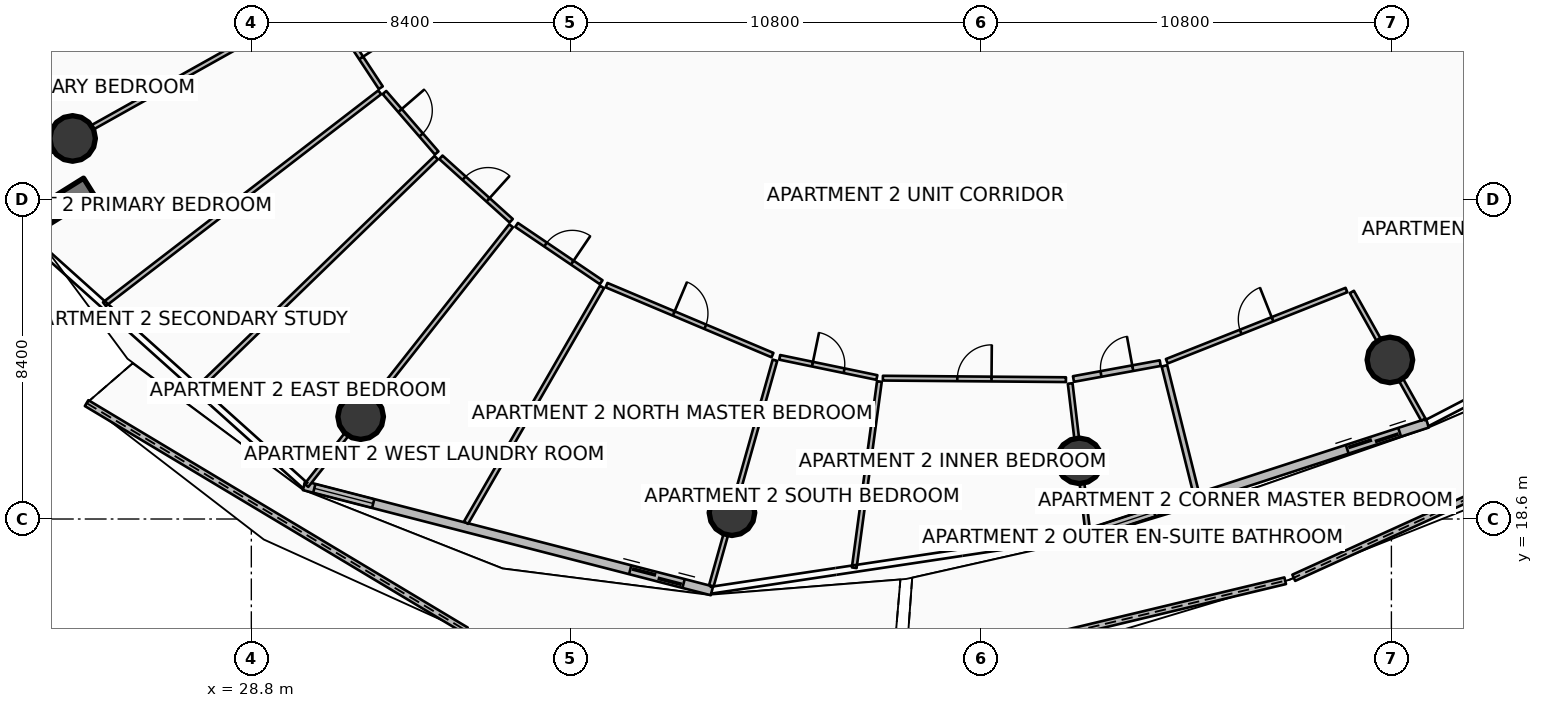
"""IFC4 building model, lengths in metres.
Left out: names, types, materials, properties, quantities, classifications, styles, units other than length and angle.
Written with IfcOpenShell. Run it as: python <this file> out.ifc"""

import sys

from ifc_helpers import new_model, si_unit, direction, frame, frame_2d, origin, origin_2d, place, context, subcontext, project, spatial, polyline, rectangle, circle, outline, extrude, element, fill, save


model = new_model("IFC4")
c1 = context("Model", 3, precision=1e-05, world=origin(), true_north=direction((0.0, 1.0)))
c2 = subcontext(c1, "Body", "Model", "MODEL_VIEW")
j1 = project(units=[si_unit("LENGTHUNIT", "METRE"), si_unit("PLANEANGLEUNIT", "RADIAN")], contexts=[c1])
p1 = place(None, origin())
s1 = spatial("IfcSite", under=j1, at=p1, CompositionType="ELEMENT")
p2 = place(p1, origin())
s2 = spatial("IfcBuilding", under=s1, at=p2, CompositionType="ELEMENT")
p3 = place(p2, frame((0.0, 0.0, 105.15)))
s3 = spatial("IfcBuildingStorey", under=s2, at=p3, CompositionType="ELEMENT", Elevation=105.15)
p4 = place(p3, frame((24.531, 27.335, 0.0), z_axis=(0.0, 0.0, 1.0), x_axis=(-0.848053161125, -0.529911158502, 0.0)))
e1 = element("IfcWall", 1, at=p4, inside=s3, PredefinedType="SOLIDWALL", context=c2, shape_type="SweptSolid", body=[
    extrude(rectangle(XDim=3.5, YDim=0.55, at=frame_2d((1.75, 0.0))), origin(), (0.0, 0.0, 1.0), 3.75),
])
for number, where, z_axis, x_axis in (
    (2, (24.097, 28.614, 0.0), (0.0, 0.0, 1.0), (1.0, 0.0, 0.0)),
    (3, (31.677, 21.294, 0.0), (0.0, 0.0, 1.0), (1.0, 0.0, 0.0)),
    (4, (41.447, 18.766, 0.0), (0.0, 0.0, 1.0), (1.0, 0.0, 0.0)),
    (5, (50.588, 20.131, 0.0), (0.0, 0.0, 1.0), (1.0, 0.0, 0.0)),
    (6, (58.76, 22.786, 0.0), (0.0, 0.0, 1.0), (1.0, 0.0, 0.0)),
):
    element("IfcColumn", number, at=place(p3, frame(where, z_axis=z_axis, x_axis=x_axis)), inside=s3, PredefinedType="COLUMN", context=c2, shape_type="SweptSolid", body=[
        extrude(circle(Radius=0.6, at=origin_2d()), origin(), (0.0, 0.0, 1.0), 3.5),
    ])
p5 = place(p3, frame((24.466, 21.65, 0.0), z_axis=(0.0, 0.0, 1.0), x_axis=(0.857737151829, -0.514088492745, 0.0)))
e7 = element("IfcWall", 7, at=p5, inside=s3, PredefinedType="PARAPET", context=c2, shape_type="SweptSolid", body=[
    extrude(outline(polyline([(0.0, 0.0), (11.638, 0.0), (11.638, 1.348), (5.819, 1.182), (0.0, 1.12), (0.0, 0.0)])), frame((0.0, 0.09, 0.0), z_axis=(0.0, -1.0, 0.0), x_axis=(1.0, 0.0, 0.0)), (0.0, 0.0, 1.0), 0.18),
])
p6 = place(p3, frame((46.01, 14.581, 0.0), z_axis=(0.0, 0.0, 1.0), x_axis=(0.972484896486, 0.232965933359, 0.0)))
e8 = element("IfcWall", 8, at=p6, inside=s3, PredefinedType="PARAPET", context=c2, shape_type="SweptSolid", body=[
    extrude(outline(polyline([(0.0, 0.0), (10.277, 0.0), (10.277, 1.832), (5.139, 1.853), (0.0, 1.756), (0.0, 0.0)])), frame((0.0, 0.09, 0.0), z_axis=(0.0, -1.0, 0.0), x_axis=(1.0, 0.0, 0.0)), (0.0, 0.0, 1.0), 0.18),
])
p7 = place(p3, frame((56.231, 17.053, 0.0), z_axis=(0.0, 0.0, 1.0), x_axis=(0.910226702808, 0.41411031078, 0.0)))
e9 = element("IfcWall", 9, at=p7, inside=s3, PredefinedType="PARAPET", context=c2, shape_type="SweptSolid", body=[
    extrude(outline(polyline([(0.0, 0.0), (10.173, 0.0), (10.173, 1.497), (5.086, 1.696), (0.0, 1.832), (0.0, 0.0)])), frame((0.0, 0.09, 0.0), z_axis=(0.0, -1.0, 0.0), x_axis=(1.0, 0.0, 0.0)), (0.0, 0.0, 1.0), 0.18),
])
p8 = place(p3, frame((30.186, 19.477, 0.0), z_axis=(0.0, 0.0, 1.0), x_axis=(0.968356180858, -0.249572248045, 0.0)))
e10 = element("IfcWall", 10, at=p8, inside=s3, PredefinedType="SOLIDWALL", context=c2, shape_type="SweptSolid", body=[
    extrude(rectangle(XDim=11.084, YDim=0.24, at=frame_2d((5.542, 0.0))), origin(), (0.0, 0.0, 1.0), 2.45),
])
p9 = place(p8, frame((8.865, 0.0, 0.0)))
e11 = element("IfcOpeningElement", 11, at=p9, cuts=e10, PredefinedType="OPENING", context=c2, shape_type="SweptSolid", body=[
    extrude(rectangle(XDim=1.45, YDim=2.15, at=frame_2d((0.725, 1.075))), frame((0.0, 0.13, 0.0), z_axis=(0.0, -1.0, 0.0), x_axis=(1.0, 0.0, 0.0)), (0.0, 0.0, 1.0), 0.26),
])
p10 = place(p8, frame((0.28, 0.0, 0.65)))
e12 = element("IfcOpeningElement", 12, at=p10, cuts=e10, PredefinedType="OPENING", context=c2, shape_type="SweptSolid", body=[
    extrude(rectangle(XDim=1.6, YDim=1.5, at=frame_2d((0.8, 0.75))), frame((0.0, 0.13, 0.0), z_axis=(0.0, -1.0, 0.0), x_axis=(1.0, 0.0, 0.0)), (0.0, 0.0, 1.0), 0.26),
])
p11 = place(p3, frame((50.767, 18.203, 0.0), z_axis=(0.0, 0.0, 1.0), x_axis=(0.951052494852, 0.30902937083, 0.0)))
e13 = element("IfcWall", 13, at=p11, inside=s3, PredefinedType="SOLIDWALL", context=c2, shape_type="SweptSolid", body=[
    extrude(rectangle(XDim=9.444, YDim=0.24, at=frame_2d((4.722, 0.0))), origin(), (0.0, 0.0, 1.0), 2.45),
])
p12 = place(p11, frame((7.224, 0.0, 0.0)))
e14 = element("IfcOpeningElement", 14, at=p12, cuts=e13, PredefinedType="OPENING", context=c2, shape_type="SweptSolid", body=[
    extrude(rectangle(XDim=1.45, YDim=2.15, at=frame_2d((0.725, 1.075))), frame((0.0, 0.13, 0.0), z_axis=(0.0, -1.0, 0.0), x_axis=(1.0, 0.0, 0.0)), (0.0, 0.0, 1.0), 0.26),
])
p13 = place(p11, frame((0.28, 0.0, 0.65)))
e15 = element("IfcOpeningElement", 15, at=p13, cuts=e13, PredefinedType="OPENING", context=c2, shape_type="SweptSolid", body=[
    extrude(rectangle(XDim=1.6, YDim=1.5, at=frame_2d((0.8, 0.75))), frame((0.0, 0.13, 0.0), z_axis=(0.0, -1.0, 0.0), x_axis=(1.0, 0.0, 0.0)), (0.0, 0.0, 1.0), 0.26),
])
p14 = place(p3, frame((30.575, 32.241, 0.0), z_axis=(0.0, 0.0, 1.0), x_axis=(-0.872502512898, -0.488609624328, 0.0)))
e16 = element("IfcWall", 16, at=p14, inside=s3, PredefinedType="PARTITIONING", context=c2, shape_type="SweptSolid", body=[
    extrude(rectangle(XDim=9.508, YDim=0.125, at=frame_2d((4.754, 0.0))), origin(), (0.0, 0.0, 1.0), 2.94),
])
p15 = place(p3, frame((32.179, 29.827, 0.0), z_axis=(0.0, 0.0, 1.0), x_axis=(-0.792545547833, -0.609812720932, 0.0)))
e17 = element("IfcWall", 17, at=p15, inside=s3, PredefinedType="PARTITIONING", context=c2, shape_type="SweptSolid", body=[
    extrude(rectangle(XDim=9.141, YDim=0.125, at=frame_2d((4.571, 0.0))), origin(), (0.0, 0.0, 1.0), 2.94),
])
p16 = place(p3, frame((33.665, 28.108, 0.0), z_axis=(0.0, 0.0, 1.0), x_axis=(-0.718119545748, -0.695919764064, 0.0)))
e18 = element("IfcWall", 18, at=p16, inside=s3, PredefinedType="PARTITIONING", context=c2, shape_type="SweptSolid", body=[
    extrude(rectangle(XDim=8.721, YDim=0.125, at=frame_2d((4.36, 0.0))), origin(), (0.0, 0.0, 1.0), 2.94),
])
p17 = place(p3, frame((30.706, 32.223, 0.0), z_axis=(0.0, 0.0, 1.0), x_axis=(0.550682420902, -0.834714844309, 0.0)))
e19 = element("IfcWall", 19, at=p17, inside=s3, PredefinedType="PARTITIONING", context=c2, shape_type="SweptSolid", body=[
    extrude(rectangle(XDim=2.725, YDim=0.125, at=frame_2d((1.362, 0.0))), origin(), (0.0, 0.0, 1.0), 2.94),
])
p18 = place(p17, frame((0.937, 0.0, 0.0)))
e20 = element("IfcOpeningElement", 20, at=p18, cuts=e19, PredefinedType="OPENING", context=c2, shape_type="SweptSolid", body=[
    extrude(rectangle(XDim=0.85, YDim=2.06, at=frame_2d((0.425, 1.03))), frame((0.0, 0.073, 0.0), z_axis=(0.0, -1.0, 0.0), x_axis=(1.0, 0.0, 0.0)), (0.0, 0.0, 1.0), 0.145),
])
p19 = place(p3, frame((32.302, 29.822, 0.0), z_axis=(0.0, 0.0, 1.0), x_axis=(0.653904073591, -0.756577466318, 0.0)))
e21 = element("IfcWall", 21, at=p19, inside=s3, PredefinedType="PARTITIONING", context=c2, shape_type="SweptSolid", body=[
    extrude(rectangle(XDim=2.102, YDim=0.125, at=frame_2d((1.051, 0.0))), origin(), (0.0, 0.0, 1.0), 2.94),
])
p20 = place(p19, frame((0.626, 0.0, 0.0)))
e22 = element("IfcOpeningElement", 22, at=p20, cuts=e21, PredefinedType="OPENING", context=c2, shape_type="SweptSolid", body=[
    extrude(rectangle(XDim=0.85, YDim=2.06, at=frame_2d((0.425, 1.03))), frame((0.0, 0.073, 0.0), z_axis=(0.0, -1.0, 0.0), x_axis=(1.0, 0.0, 0.0)), (0.0, 0.0, 1.0), 0.145),
])
p21 = place(p3, frame((33.789, 28.117, 0.0), z_axis=(0.0, 0.0, 1.0), x_axis=(0.742250438722, -0.670122590439, 0.0)))
e23 = element("IfcWall", 23, at=p21, inside=s3, PredefinedType="PARTITIONING", context=c2, shape_type="SweptSolid", body=[
    extrude(rectangle(XDim=2.491, YDim=0.125, at=frame_2d((1.246, 0.0))), origin(), (0.0, 0.0, 1.0), 2.94),
])
p22 = place(p21, frame((0.821, 0.0, 0.0)))
e24 = element("IfcOpeningElement", 24, at=p22, cuts=e23, PredefinedType="OPENING", context=c2, shape_type="SweptSolid", body=[
    extrude(rectangle(XDim=0.85, YDim=2.06, at=frame_2d((0.425, 1.03))), frame((0.0, 0.073, 0.0), z_axis=(0.0, -1.0, 0.0), x_axis=(1.0, 0.0, 0.0)), (0.0, 0.0, 1.0), 0.145),
])
p23 = place(p3, frame((35.635, 26.316, 0.0), z_axis=(0.0, 0.0, 1.0), x_axis=(-0.619089966413, -0.785320070727, 0.0)))
e25 = element("IfcWall", 25, at=p23, inside=s3, PredefinedType="PARTITIONING", context=c2, shape_type="SweptSolid", body=[
    extrude(rectangle(XDim=8.699, YDim=0.125, at=frame_2d((4.35, 0.0))), origin(), (0.0, 0.0, 1.0), 2.94),
])
p24 = place(p3, frame((38.028, 24.707, 0.0), z_axis=(0.0, 0.0, 1.0), x_axis=(-0.499570967342, -0.866272964249, 0.0)))
e26 = element("IfcWall", 26, at=p24, inside=s3, PredefinedType="PARTITIONING", context=c2, shape_type="SweptSolid", body=[
    extrude(rectangle(XDim=7.162, YDim=0.125, at=frame_2d((3.581, 0.0))), origin(), (0.0, 0.0, 1.0), 2.94),
])
p25 = place(p3, frame((35.78, 26.338, 0.0), z_axis=(0.0, 0.0, 1.0), x_axis=(0.827963562543, -0.560781899762, 0.0)))
e27 = element("IfcWall", 27, at=p25, inside=s3, PredefinedType="PARTITIONING", context=c2, shape_type="SweptSolid", body=[
    extrude(rectangle(XDim=2.689, YDim=0.125, at=frame_2d((1.345, 0.0))), origin(), (0.0, 0.0, 1.0), 2.94),
])
p26 = place(p25, frame((0.92, 0.0, 0.0)))
e28 = element("IfcOpeningElement", 28, at=p26, cuts=e27, PredefinedType="OPENING", context=c2, shape_type="SweptSolid", body=[
    extrude(rectangle(XDim=0.85, YDim=2.06, at=frame_2d((0.425, 1.03))), frame((0.0, 0.073, 0.0), z_axis=(0.0, -1.0, 0.0), x_axis=(1.0, 0.0, 0.0)), (0.0, 0.0, 1.0), 0.145),
])
p27 = place(p3, frame((38.147, 24.754, 0.0), z_axis=(0.0, 0.0, 1.0), x_axis=(0.921465596947, -0.388459976888, 0.0)))
e29 = element("IfcWall", 29, at=p27, inside=s3, PredefinedType="PARTITIONING", context=c2, shape_type="SweptSolid", body=[
    extrude(rectangle(XDim=4.74, YDim=0.125, at=frame_2d((2.37, 0.0))), origin(), (0.0, 0.0, 1.0), 2.94),
])
p28 = place(p27, frame((1.92, 0.0, 0.0)))
e30 = element("IfcOpeningElement", 30, at=p28, cuts=e29, PredefinedType="OPENING", context=c2, shape_type="SweptSolid", body=[
    extrude(rectangle(XDim=0.9, YDim=2.08, at=frame_2d((0.45, 1.04))), frame((0.0, 0.073, 0.0), z_axis=(0.0, -1.0, 0.0), x_axis=(1.0, 0.0, 0.0)), (0.0, 0.0, 1.0), 0.145),
])
p29 = place(p3, frame((42.579, 22.778, 0.0), z_axis=(0.0, 0.0, 1.0), x_axis=(-0.271466748189, -0.962447819171, 0.0)))
e31 = element("IfcWall", 31, at=p29, inside=s3, PredefinedType="PARTITIONING", context=c2, shape_type="SweptSolid", body=[
    extrude(rectangle(XDim=6.166, YDim=0.125, at=frame_2d((3.083, 0.0))), origin(), (0.0, 0.0, 1.0), 2.94),
])
p30 = place(p3, frame((45.327, 22.218, 0.0), z_axis=(0.0, 0.0, 1.0), x_axis=(-0.133861540622, -0.99100004437, 0.0)))
e32 = element("IfcWall", 32, at=p30, inside=s3, PredefinedType="PARTITIONING", context=c2, shape_type="SweptSolid", body=[
    extrude(rectangle(XDim=4.944, YDim=0.125, at=frame_2d((2.472, 0.0))), origin(), (0.0, 0.0, 1.0), 2.94),
])
p31 = place(p3, frame((42.704, 22.854, 0.0), z_axis=(0.0, 0.0, 1.0), x_axis=(0.979145769619, -0.203158957069, 0.0)))
e33 = element("IfcWall", 33, at=p31, inside=s3, PredefinedType="PARTITIONING", context=c2, shape_type="SweptSolid", body=[
    extrude(rectangle(XDim=2.611, YDim=0.125, at=frame_2d((1.306, 0.0))), origin(), (0.0, 0.0, 1.0), 2.94),
])
p32 = place(p31, frame((0.881, 0.0, 0.0)))
e34 = element("IfcOpeningElement", 34, at=p32, cuts=e33, PredefinedType="OPENING", context=c2, shape_type="SweptSolid", body=[
    extrude(rectangle(XDim=0.85, YDim=2.06, at=frame_2d((0.425, 1.03))), frame((0.0, 0.073, 0.0), z_axis=(0.0, -1.0, 0.0), x_axis=(1.0, 0.0, 0.0)), (0.0, 0.0, 1.0), 0.145),
])
p33 = place(p3, frame((45.419, 22.306, 0.0), z_axis=(0.0, 0.0, 1.0), x_axis=(0.99996628587, -0.008211401983, 0.0)))
e35 = element("IfcWall", 35, at=p33, inside=s3, PredefinedType="PARTITIONING", context=c2, shape_type="SweptSolid", body=[
    extrude(rectangle(XDim=4.817, YDim=0.125, at=frame_2d((2.408, 0.0))), origin(), (0.0, 0.0, 1.0), 2.94),
])
p34 = place(p33, frame((1.958, 0.0, 0.0)))
e36 = element("IfcOpeningElement", 36, at=p34, cuts=e35, PredefinedType="OPENING", context=c2, shape_type="SweptSolid", body=[
    extrude(rectangle(XDim=0.9, YDim=2.08, at=frame_2d((0.45, 1.04))), frame((0.0, 0.073, 0.0), z_axis=(0.0, -1.0, 0.0), x_axis=(1.0, 0.0, 0.0)), (0.0, 0.0, 1.0), 0.145),
])
p35 = place(p3, frame((50.347, 22.167, 0.0), z_axis=(0.0, 0.0, 1.0), x_axis=(0.117544011215, -0.993067674143, 0.0)))
e37 = element("IfcWall", 37, at=p35, inside=s3, PredefinedType="PARTITIONING", context=c2, shape_type="SweptSolid", body=[
    extrude(rectangle(XDim=3.95, YDim=0.125, at=frame_2d((1.975, 0.0))), origin(), (0.0, 0.0, 1.0), 2.94),
])
p36 = place(p3, frame((57.759, 24.575, 0.0), z_axis=(0.0, 0.0, 1.0), x_axis=(0.488595646066, -0.87251034071, 0.0)))
e38 = element("IfcWall", 38, at=p36, inside=s3, PredefinedType="PARTITIONING", context=c2, shape_type="SweptSolid", body=[
    extrude(rectangle(XDim=3.851, YDim=0.125, at=frame_2d((1.925, 0.0))), origin(), (0.0, 0.0, 1.0), 2.94),
])
p37 = place(p3, frame((50.434, 22.284, 0.0), z_axis=(0.0, 0.0, 1.0), x_axis=(0.983653785842, 0.18007006858, 0.0)))
e39 = element("IfcWall", 39, at=p37, inside=s3, PredefinedType="PARTITIONING", context=c2, shape_type="SweptSolid", body=[
    extrude(rectangle(XDim=2.321, YDim=0.15, at=frame_2d((1.161, 0.0))), origin(), (0.0, 0.0, 1.0), 2.94),
])
p38 = place(p37, frame((0.736, 0.0, 0.0)))
e40 = element("IfcOpeningElement", 40, at=p38, cuts=e39, PredefinedType="OPENING", context=c2, shape_type="SweptSolid", body=[
    extrude(rectangle(XDim=0.85, YDim=2.06, at=frame_2d((0.425, 1.03))), frame((0.0, 0.085, 0.0), z_axis=(0.0, -1.0, 0.0), x_axis=(1.0, 0.0, 0.0)), (0.0, 0.0, 1.0), 0.17),
])
p39 = place(p3, frame((52.828, 22.631, 0.0), z_axis=(0.0, 0.0, 1.0), x_axis=(0.241821205531, -0.970320825581, 0.0)))
e41 = element("IfcWall", 41, at=p39, inside=s3, PredefinedType="PARTITIONING", context=c2, shape_type="SweptSolid", body=[
    extrude(rectangle(XDim=3.458, YDim=0.15, at=frame_2d((1.729, 0.0))), origin(), (0.0, 0.0, 1.0), 2.94),
])
p40 = place(p3, frame((52.889, 22.751, 0.0), z_axis=(0.0, 0.0, 1.0), x_axis=(0.929640857273, 0.368466927266, 0.0)))
e42 = element("IfcWall", 42, at=p40, inside=s3, PredefinedType="PARTITIONING", context=c2, shape_type="SweptSolid", body=[
    extrude(rectangle(XDim=5.085, YDim=0.125, at=frame_2d((2.543, 0.0))), origin(), (0.0, 0.0, 1.0), 2.94),
])
p41 = place(p40, frame((2.093, 0.0, 0.0)))
e43 = element("IfcOpeningElement", 43, at=p41, cuts=e42, PredefinedType="OPENING", context=c2, shape_type="SweptSolid", body=[
    extrude(rectangle(XDim=0.9, YDim=2.08, at=frame_2d((0.45, 1.04))), frame((0.0, 0.073, 0.0), z_axis=(0.0, -1.0, 0.0), x_axis=(1.0, 0.0, 0.0)), (0.0, 0.0, 1.0), 0.145),
])
p42 = place(p9, origin())
e44 = element("IfcDoor", 44, at=p42, inside=s3, OperationType="DOUBLE_DOOR_SLIDING", PredefinedType="DOOR", context=c2, shape_type="SweptSolid", body=[
    extrude(rectangle(XDim=1.45, YDim=2.15, at=frame_2d((0.725, 1.075))), frame((0.0, 0.025, 0.0), z_axis=(0.0, -1.0, 0.0), x_axis=(1.0, 0.0, 0.0)), (0.0, 0.0, 1.0), 0.05),
])
fill(e11, e44)
p43 = place(p10, origin())
e45 = element("IfcWindow", 45, at=p43, inside=s3, PartitioningType="SINGLE_PANEL", PredefinedType="WINDOW", context=c2, shape_type="SweptSolid", body=[
    extrude(rectangle(XDim=1.6, YDim=1.5, at=frame_2d((0.8, 0.75))), frame((0.0, 0.03, 0.0), z_axis=(0.0, -1.0, 0.0), x_axis=(1.0, 0.0, 0.0)), (0.0, 0.0, 1.0), 0.06),
])
fill(e12, e45)
p44 = place(p12, origin())
e46 = element("IfcDoor", 46, at=p44, inside=s3, OperationType="DOUBLE_DOOR_SLIDING", PredefinedType="DOOR", context=c2, shape_type="SweptSolid", body=[
    extrude(rectangle(XDim=1.45, YDim=2.15, at=frame_2d((0.725, 1.075))), frame((0.0, 0.025, 0.0), z_axis=(0.0, -1.0, 0.0), x_axis=(1.0, 0.0, 0.0)), (0.0, 0.0, 1.0), 0.05),
])
fill(e14, e46)
p45 = place(p13, origin())
e47 = element("IfcWindow", 47, at=p45, inside=s3, PartitioningType="SINGLE_PANEL", PredefinedType="WINDOW", context=c2, shape_type="SweptSolid", body=[
    extrude(rectangle(XDim=1.6, YDim=1.5, at=frame_2d((0.8, 0.75))), frame((0.0, 0.03, 0.0), z_axis=(0.0, -1.0, 0.0), x_axis=(1.0, 0.0, 0.0)), (0.0, 0.0, 1.0), 0.06),
])
fill(e15, e47)
p46 = place(p18, origin())
e48 = element("IfcDoor", 48, at=p46, inside=s3, OperationType="SINGLE_SWING_RIGHT", PredefinedType="DOOR", context=c2, shape_type="SweptSolid", body=[
    extrude(rectangle(XDim=0.85, YDim=2.06, at=frame_2d((0.425, 1.03))), frame((0.0, 0.025, 0.0), z_axis=(0.0, -1.0, 0.0), x_axis=(1.0, 0.0, 0.0)), (0.0, 0.0, 1.0), 0.05),
])
fill(e20, e48)
p47 = place(p20, origin())
e49 = element("IfcDoor", 49, at=p47, inside=s3, OperationType="SINGLE_SWING_LEFT", PredefinedType="DOOR", context=c2, shape_type="SweptSolid", body=[
    extrude(rectangle(XDim=0.85, YDim=2.06, at=frame_2d((0.425, 1.03))), frame((0.0, 0.025, 0.0), z_axis=(0.0, -1.0, 0.0), x_axis=(1.0, 0.0, 0.0)), (0.0, 0.0, 1.0), 0.05),
])
fill(e22, e49)
p48 = place(p22, origin())
e50 = element("IfcDoor", 50, at=p48, inside=s3, OperationType="SINGLE_SWING_RIGHT", PredefinedType="DOOR", context=c2, shape_type="SweptSolid", body=[
    extrude(rectangle(XDim=0.85, YDim=2.06, at=frame_2d((0.425, 1.03))), frame((0.0, 0.025, 0.0), z_axis=(0.0, -1.0, 0.0), x_axis=(1.0, 0.0, 0.0)), (0.0, 0.0, 1.0), 0.05),
])
fill(e24, e50)
p49 = place(p26, origin())
e51 = element("IfcDoor", 51, at=p49, inside=s3, OperationType="SINGLE_SWING_RIGHT", PredefinedType="DOOR", context=c2, shape_type="SweptSolid", body=[
    extrude(rectangle(XDim=0.85, YDim=2.06, at=frame_2d((0.425, 1.03))), frame((0.0, 0.025, 0.0), z_axis=(0.0, -1.0, 0.0), x_axis=(1.0, 0.0, 0.0)), (0.0, 0.0, 1.0), 0.05),
])
fill(e28, e51)
p50 = place(p28, origin())
e52 = element("IfcDoor", 52, at=p50, inside=s3, OperationType="SINGLE_SWING_LEFT", PredefinedType="DOOR", context=c2, shape_type="SweptSolid", body=[
    extrude(rectangle(XDim=0.9, YDim=2.08, at=frame_2d((0.45, 1.04))), frame((0.0, 0.025, 0.0), z_axis=(0.0, -1.0, 0.0), x_axis=(1.0, 0.0, 0.0)), (0.0, 0.0, 1.0), 0.05),
])
fill(e30, e52)
p51 = place(p32, origin())
e53 = element("IfcDoor", 53, at=p51, inside=s3, OperationType="SINGLE_SWING_LEFT", PredefinedType="DOOR", context=c2, shape_type="SweptSolid", body=[
    extrude(rectangle(XDim=0.85, YDim=2.06, at=frame_2d((0.425, 1.03))), frame((0.0, 0.025, 0.0), z_axis=(0.0, -1.0, 0.0), x_axis=(1.0, 0.0, 0.0)), (0.0, 0.0, 1.0), 0.05),
])
fill(e34, e53)
p52 = place(p34, origin())
e54 = element("IfcDoor", 54, at=p52, inside=s3, OperationType="SINGLE_SWING_RIGHT", PredefinedType="DOOR", context=c2, shape_type="SweptSolid", body=[
    extrude(rectangle(XDim=0.9, YDim=2.08, at=frame_2d((0.45, 1.04))), frame((0.0, 0.025, 0.0), z_axis=(0.0, -1.0, 0.0), x_axis=(1.0, 0.0, 0.0)), (0.0, 0.0, 1.0), 0.05),
])
fill(e36, e54)
p53 = place(p38, origin())
e55 = element("IfcDoor", 55, at=p53, inside=s3, OperationType="SINGLE_SWING_RIGHT", PredefinedType="DOOR", context=c2, shape_type="SweptSolid", body=[
    extrude(rectangle(XDim=0.85, YDim=2.06, at=frame_2d((0.425, 1.03))), frame((0.0, 0.025, 0.0), z_axis=(0.0, -1.0, 0.0), x_axis=(1.0, 0.0, 0.0)), (0.0, 0.0, 1.0), 0.05),
])
fill(e40, e55)
p54 = place(p41, origin())
e56 = element("IfcDoor", 56, at=p54, inside=s3, OperationType="SINGLE_SWING_RIGHT", PredefinedType="DOOR", context=c2, shape_type="SweptSolid", body=[
    extrude(rectangle(XDim=0.9, YDim=2.08, at=frame_2d((0.45, 1.04))), frame((0.0, 0.025, 0.0), z_axis=(0.0, -1.0, 0.0), x_axis=(1.0, 0.0, 0.0)), (0.0, 0.0, 1.0), 0.05),
])
fill(e43, e56)
save(model, sys.argv[1])
